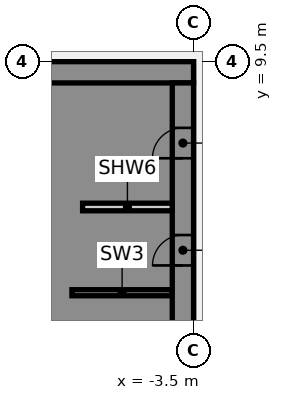
"""IFC4 building model, lengths in metres.
Left out: names, types, materials, properties, quantities, classifications, styles, units other than length and angle.
Written with IfcOpenShell. Run it as: python <this file> out.ifc"""

import sys

from ifc_helpers import new_model, si_unit, direction, frame, frame_2d, origin, place, context, subcontext, project, spatial, polyline, rectangle, outline, extrude, element, fill, save


model = new_model("IFC4")
c1 = context("Model", 3, precision=1e-05, world=origin(), true_north=direction((0.0, 1.0)))
c2 = subcontext(c1, "Body", "Model", "MODEL_VIEW")
j1 = project(units=[si_unit("LENGTHUNIT", "METRE"), si_unit("PLANEANGLEUNIT", "RADIAN")], contexts=[c1])
p1 = place(None, origin())
s1 = spatial("IfcSite", under=j1, at=p1, CompositionType="ELEMENT")
p2 = place(p1, origin())
s2 = spatial("IfcBuilding", under=s1, at=p2, CompositionType="ELEMENT")
p3 = place(p2, frame((0.0, 0.0, 49.0)))
s3 = spatial("IfcBuildingStorey", under=s2, at=p3, CompositionType="ELEMENT", Elevation=49.0)
p4 = place(p3, frame((-16.5, 9.15, 0.0), z_axis=(0.0, 0.0, 1.0), x_axis=(1.0, 0.0, 0.0)))
e1 = element("IfcWall", 1, at=p4, inside=s3, PredefinedType="SHEAR", context=c2, shape_type="SweptSolid", body=[
    extrude(rectangle(XDim=13.0, YDim=0.7, at=frame_2d((6.5, 0.0))), origin(), (0.0, 0.0, 1.0), 3.61),
])
p5 = place(p3, origin())
e2 = element("IfcWall", 2, at=p5, inside=s3, PredefinedType="SHEAR", context=c2, shape_type="SweptSolid", body=[
    extrude(outline(polyline([(-9.8, -5.375), (-9.8, -5.625), (-7.5, -5.625), (-7.15, -5.625), (-7.15, 8.8), (-7.5, 8.8), (-9.8, 8.8), (-9.8, 8.125), (-7.5, 8.125), (-7.5, 5.625), (-9.8, 5.625), (-9.8, 5.375), (-7.5, 5.375), (-7.5, 2.875), (-9.8, 2.875), (-9.8, 2.625), (-7.5, 2.625), (-7.5, 0.125), (-9.8, 0.125), (-9.8, -0.125), (-7.5, -0.125), (-7.5, -2.625), (-9.8, -2.625), (-9.8, -2.875), (-7.5, -2.875), (-7.5, -5.375), (-9.8, -5.375)])), origin(), (0.0, 0.0, 1.0), 3.61),
])
p6 = place(p3, frame((-7.5, 1.9, 0.0), z_axis=(0.0, 0.0, 1.0), x_axis=(1.0, 0.0, 0.0)))
e3 = element("IfcWall", 3, at=p6, inside=s3, PredefinedType="SHEAR", context=c2, shape_type="SweptSolid", body=[
    extrude(rectangle(XDim=3.3, YDim=0.2, at=frame_2d((1.65, 0.0))), origin(), (0.0, 0.0, 1.0), 3.61),
])
p7 = place(p3, frame((-3.85, -8.8, 0.0), z_axis=(0.0, 0.0, 1.0), x_axis=(0.0, 1.0, 0.0)))
e4 = element("IfcWall", 4, at=p7, inside=s3, PredefinedType="SHEAR", context=c2, shape_type="SweptSolid", body=[
    extrude(rectangle(XDim=17.6, YDim=0.7, at=frame_2d((8.8, 0.0))), origin(), (0.0, 0.0, 1.0), 3.61),
])
p8 = place(p7, frame((1.15, 0.0, 0.0)))
e5 = element("IfcOpeningElement", 5, at=p8, cuts=e4, PredefinedType="OPENING", context=c2, shape_type="SweptSolid", body=[
    extrude(rectangle(XDim=1.8, YDim=2.1, at=frame_2d((0.9, 1.05))), frame((0.0, 0.36, 0.0), z_axis=(0.0, -1.0, 0.0), x_axis=(1.0, 0.0, 0.0)), (0.0, 0.0, 1.0), 0.72),
])
p9 = place(p7, frame((11.597, 0.0, 0.0)))
e6 = element("IfcOpeningElement", 6, at=p9, cuts=e4, PredefinedType="OPENING", context=c2, shape_type="SweptSolid", body=[
    extrude(rectangle(XDim=1.0, YDim=2.1, at=frame_2d((0.5, 1.05))), frame((0.0, 0.36, 0.0), z_axis=(0.0, -1.0, 0.0), x_axis=(1.0, 0.0, 0.0)), (0.0, 0.0, 1.0), 0.72),
])
p10 = place(p7, frame((15.123, 0.0, 0.0)))
e7 = element("IfcOpeningElement", 7, at=p10, cuts=e4, PredefinedType="OPENING", context=c2, shape_type="SweptSolid", body=[
    extrude(rectangle(XDim=1.0, YDim=2.1, at=frame_2d((0.5, 1.05))), frame((0.0, 0.36, 0.0), z_axis=(0.0, -1.0, 0.0), x_axis=(1.0, 0.0, 0.0)), (0.0, 0.0, 1.0), 0.72),
])
p11 = place(p3, frame((-7.15, 4.72, 0.0), z_axis=(0.0, 0.0, 1.0), x_axis=(1.0, 0.0, 0.0)))
e8 = element("IfcWall", 8, at=p11, inside=s3, PredefinedType="PARTITIONING", context=c2, shape_type="SweptSolid", body=[
    extrude(rectangle(XDim=2.95, YDim=0.25, at=frame_2d((1.475, 0.0))), origin(), (0.0, 0.0, 1.0), 3.61),
])
p12 = place(p9, origin())
e9 = element("IfcDoor", 9, at=p12, inside=s3, OperationType="SINGLE_SWING_LEFT", PredefinedType="DOOR", context=c2, shape_type="SweptSolid", body=[
    extrude(rectangle(XDim=1.0, YDim=2.1, at=frame_2d((0.5, 1.05))), frame((0.0, 0.325, 0.0), z_axis=(0.0, -1.0, 0.0), x_axis=(1.0, 0.0, 0.0)), (0.0, 0.0, 1.0), 0.05),
])
fill(e6, e9)
p13 = place(p10, origin())
e10 = element("IfcDoor", 10, at=p13, inside=s3, OperationType="SINGLE_SWING_LEFT", PredefinedType="DOOR", context=c2, shape_type="SweptSolid", body=[
    extrude(rectangle(XDim=1.0, YDim=2.1, at=frame_2d((0.5, 1.05))), frame((0.0, 0.325, 0.0), z_axis=(0.0, -1.0, 0.0), x_axis=(1.0, 0.0, 0.0)), (0.0, 0.0, 1.0), 0.05),
])
fill(e7, e10)
save(model, sys.argv[1])
